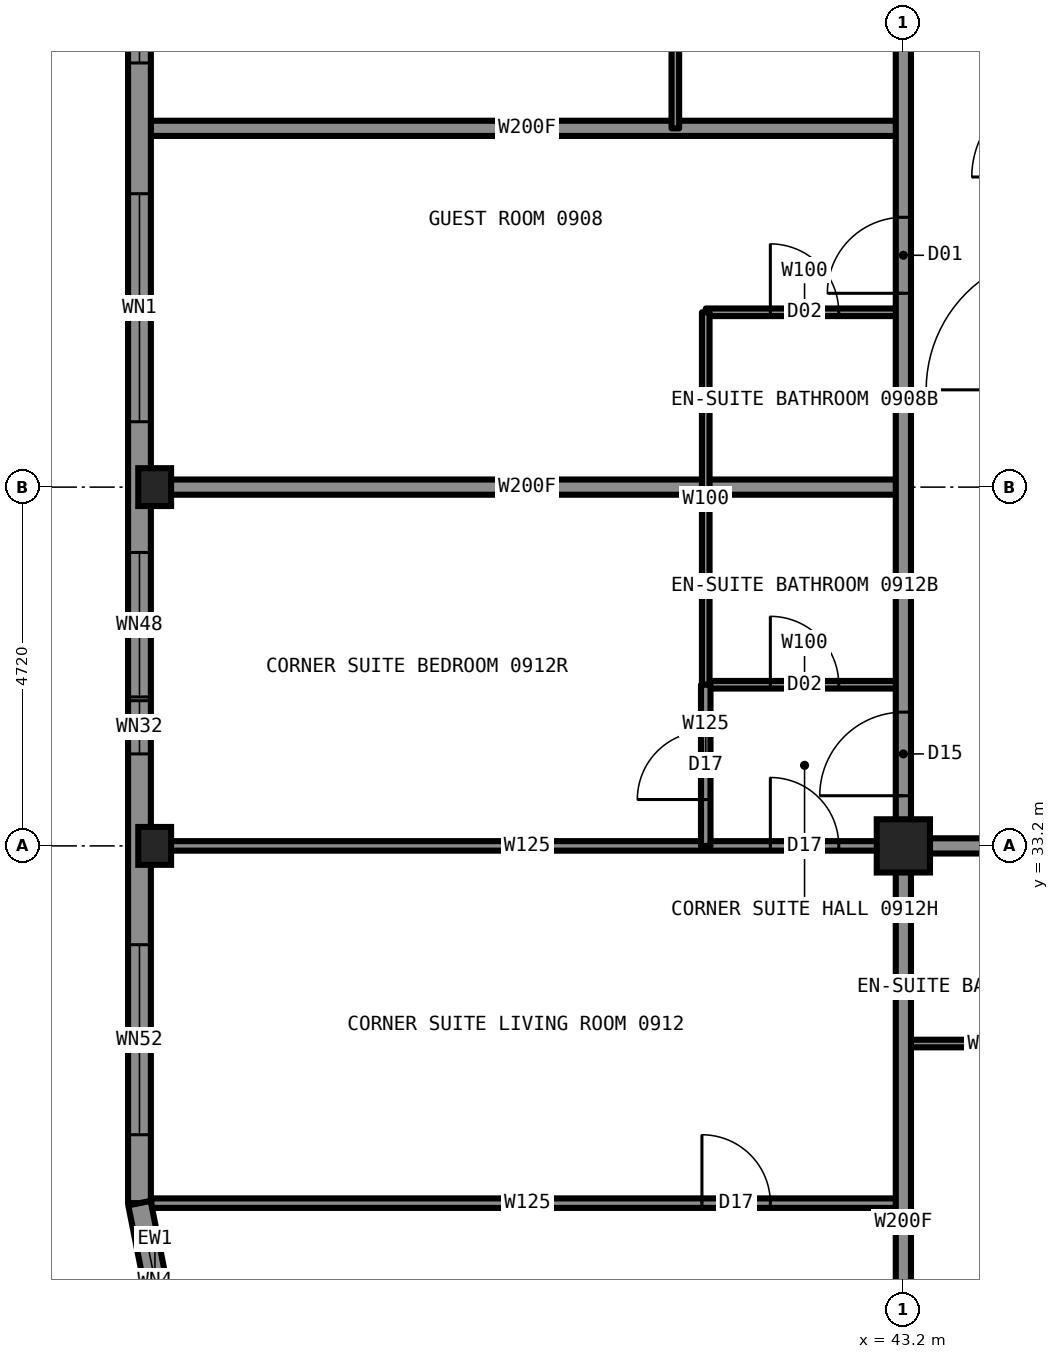
"""IFC4 building model, lengths in metres.
Left out: names, types, materials, properties, quantities, classifications, styles, units other than length and angle.
Written with IfcOpenShell. Run it as: python <this file> out.ifc"""

import sys

from ifc_helpers import new_model, si_unit, direction, frame, frame_2d, origin, origin_2d, place, context, subcontext, project, spatial, rectangle, hollow_rectangle, i_section, extrude, element, fill, save


model = new_model("IFC4")
c1 = context("Model", 3, precision=1e-05, world=origin(), true_north=direction((0.0, 1.0)))
c2 = subcontext(c1, "Body", "Model", "MODEL_VIEW")
j1 = project(units=[si_unit("LENGTHUNIT", "METRE"), si_unit("PLANEANGLEUNIT", "RADIAN")], contexts=[c1])
p1 = place(None, origin())
s1 = spatial("IfcSite", under=j1, at=p1, CompositionType="ELEMENT")
p2 = place(p1, origin())
s2 = spatial("IfcBuilding", under=s1, at=p2, CompositionType="ELEMENT")
p3 = place(p2, frame((0.0, 0.0, 39.0)))
s3 = spatial("IfcBuildingStorey", under=s2, at=p3, CompositionType="ELEMENT", Elevation=39.0)
for number, where, z_axis, x_axis in (
    (1, (33.35, 33.2, 0.0), (0.0, 0.0, 1.0), (1.0, 0.0, 0.0)),
    (2, (33.35, 37.92, 0.0), (0.0, 0.0, 1.0), (1.0, 0.0, 0.0)),
):
    element("IfcColumn", number, at=place(p3, frame(where, z_axis=z_axis, x_axis=x_axis)), inside=s3, PredefinedType="COLUMN", context=c2, shape_type="SweptSolid", body=[
        extrude(i_section(OverallWidth=0.432, OverallDepth=0.498, WebThickness=0.056, FlangeThickness=0.089, at=origin_2d()), origin(), (0.0, 0.0, 1.0), 3.5),
    ])
p4 = place(p3, frame((43.2, 33.2, 0.0), z_axis=(0.0, 0.0, 1.0), x_axis=(1.0, 0.0, 0.0)))
e3 = element("IfcColumn", 3, at=p4, inside=s3, PredefinedType="COLUMN", context=c2, shape_type="SweptSolid", body=[
    extrude(hollow_rectangle(XDim=0.7, YDim=0.7, WallThickness=0.06, at=origin_2d()), origin(), (0.0, 0.0, 1.0), 3.5),
])
p5 = place(p3, frame((43.2, 33.2, 0.0), z_axis=(0.0, 0.0, 1.0), x_axis=(1.0, 0.0, 0.0)))
e4 = element("IfcWall", 4, at=p5, inside=s3, PredefinedType="PARTITIONING", context=c2, shape_type="SweptSolid", body=[
    extrude(rectangle(XDim=23.6, YDim=0.2, at=frame_2d((11.8, 0.0))), origin(), (0.0, 0.0, 1.0), 3.33),
])
p6 = place(p5, frame((2.55, 0.0, 0.0)))
e5 = element("IfcOpeningElement", 5, at=p6, cuts=e4, PredefinedType="OPENING", context=c2, shape_type="SweptSolid", body=[
    extrude(rectangle(XDim=1.0, YDim=2.2, at=frame_2d((0.5, 1.1))), frame((0.0, 0.11, 0.0), z_axis=(0.0, -1.0, 0.0), x_axis=(1.0, 0.0, 0.0)), (0.0, 0.0, 1.0), 0.22),
])
p7 = place(p5, frame((6.57, 0.0, 0.0)))
e6 = element("IfcOpeningElement", 6, at=p7, cuts=e4, PredefinedType="OPENING", context=c2, shape_type="SweptSolid", body=[
    extrude(rectangle(XDim=1.1, YDim=2.2, at=frame_2d((0.55, 1.1))), frame((0.0, 0.11, 0.0), z_axis=(0.0, -1.0, 0.0), x_axis=(1.0, 0.0, 0.0)), (0.0, 0.0, 1.0), 0.22),
])
p8 = place(p5, frame((20.34, 0.0, 0.0)))
e7 = element("IfcOpeningElement", 7, at=p8, cuts=e4, PredefinedType="OPENING", context=c2, shape_type="SweptSolid", body=[
    extrude(rectangle(XDim=1.0, YDim=2.2, at=frame_2d((0.5, 1.1))), frame((0.0, 0.11, 0.0), z_axis=(0.0, -1.0, 0.0), x_axis=(1.0, 0.0, 0.0)), (0.0, 0.0, 1.0), 0.22),
])
p9 = place(p3, frame((33.3, 33.2, 0.0), z_axis=(0.0, 0.0, 1.0), x_axis=(1.0, 0.0, 0.0)))
e8 = element("IfcWall", 8, at=p9, inside=s3, PredefinedType="PARTITIONING", context=c2, shape_type="SweptSolid", body=[
    extrude(rectangle(XDim=9.9, YDim=0.125, at=frame_2d((4.95, 0.0))), origin(), (0.0, 0.0, 1.0), 2.573),
])
p10 = place(p9, frame((8.15, 0.0, 0.0)))
e9 = element("IfcOpeningElement", 9, at=p10, cuts=e8, PredefinedType="OPENING", context=c2, shape_type="SweptSolid", body=[
    extrude(rectangle(XDim=0.9, YDim=2.2, at=frame_2d((0.45, 1.1))), frame((0.0, 0.073, 0.0), z_axis=(0.0, -1.0, 0.0), x_axis=(1.0, 0.0, 0.0)), (0.0, 0.0, 1.0), 0.145),
])
p11 = place(p3, frame((43.2, 30.6, 0.0), z_axis=(0.0, 0.0, 1.0), x_axis=(1.0, 0.0, 0.0)))
e10 = element("IfcWall", 10, at=p11, inside=s3, PredefinedType="PARTITIONING", context=c2, shape_type="SweptSolid", body=[
    extrude(rectangle(XDim=2.3, YDim=0.1, at=frame_2d((1.15, 0.0))), origin(), (0.0, 0.0, 1.0), 3.33),
])
p12 = place(p3, frame((33.306, 28.5, 0.0), z_axis=(0.0, 0.0, 1.0), x_axis=(1.0, 0.0, 0.0)))
e11 = element("IfcWall", 11, at=p12, inside=s3, PredefinedType="PARTITIONING", context=c2, shape_type="SweptSolid", body=[
    extrude(rectangle(XDim=9.894, YDim=0.125, at=frame_2d((4.947, 0.0))), origin(), (0.0, 0.0, 1.0), 3.33),
])
p13 = place(p12, frame((7.244, 0.0, 0.0)))
e12 = element("IfcOpeningElement", 12, at=p13, cuts=e11, PredefinedType="OPENING", context=c2, shape_type="SweptSolid", body=[
    extrude(rectangle(XDim=0.9, YDim=2.2, at=frame_2d((0.45, 1.1))), frame((0.0, 0.073, 0.0), z_axis=(0.0, -1.0, 0.0), x_axis=(1.0, 0.0, 0.0)), (0.0, 0.0, 1.0), 0.145),
])
p14 = place(p3, frame((33.3, 42.64, 0.0), z_axis=(0.0, 0.0, 1.0), x_axis=(1.0, 0.0, 0.0)))
e13 = element("IfcWall", 13, at=p14, inside=s3, PredefinedType="PARTITIONING", context=c2, shape_type="SweptSolid", body=[
    extrude(rectangle(XDim=9.9, YDim=0.2, at=frame_2d((4.95, 0.0))), origin(), (0.0, 0.0, 1.0), 2.723),
])
p15 = place(p3, frame((40.6, 40.22, 0.0), z_axis=(0.0, 0.0, 1.0), x_axis=(1.0, 0.0, 0.0)))
e14 = element("IfcWall", 14, at=p15, inside=s3, PredefinedType="PARTITIONING", context=c2, shape_type="SweptSolid", body=[
    extrude(rectangle(XDim=2.6, YDim=0.1, at=frame_2d((1.3, 0.0))), origin(), (0.0, 0.0, 1.0), 2.723),
])
p16 = place(p15, frame((0.85, 0.0, 0.0)))
e15 = element("IfcOpeningElement", 15, at=p16, cuts=e14, PredefinedType="OPENING", context=c2, shape_type="SweptSolid", body=[
    extrude(rectangle(XDim=0.9, YDim=2.1, at=frame_2d((0.45, 1.05))), frame((0.0, 0.06, 0.0), z_axis=(0.0, -1.0, 0.0), x_axis=(1.0, 0.0, 0.0)), (0.0, 0.0, 1.0), 0.12),
])
p17 = place(p3, frame((33.3, 37.92, 0.0), z_axis=(0.0, 0.0, 1.0), x_axis=(1.0, 0.0, 0.0)))
e16 = element("IfcWall", 16, at=p17, inside=s3, PredefinedType="PARTITIONING", context=c2, shape_type="SweptSolid", body=[
    extrude(rectangle(XDim=9.9, YDim=0.2, at=frame_2d((4.95, 0.0))), origin(), (0.0, 0.0, 1.0), 2.573),
])
p18 = place(p3, frame((40.6, 35.32, 0.0), z_axis=(0.0, 0.0, 1.0), x_axis=(1.0, 0.0, 0.0)))
e17 = element("IfcWall", 17, at=p18, inside=s3, PredefinedType="PARTITIONING", context=c2, shape_type="SweptSolid", body=[
    extrude(rectangle(XDim=2.6, YDim=0.1, at=frame_2d((1.3, 0.0))), origin(), (0.0, 0.0, 1.0), 3.33),
])
p19 = place(p18, frame((0.85, 0.0, 0.0)))
e18 = element("IfcOpeningElement", 18, at=p19, cuts=e17, PredefinedType="OPENING", context=c2, shape_type="SweptSolid", body=[
    extrude(rectangle(XDim=0.9, YDim=2.1, at=frame_2d((0.45, 1.05))), frame((0.0, 0.06, 0.0), z_axis=(0.0, -1.0, 0.0), x_axis=(1.0, 0.0, 0.0)), (0.0, 0.0, 1.0), 0.12),
])
p20 = place(p3, frame((43.2, 33.2, 0.0), z_axis=(0.0, 0.0, 1.0), x_axis=(0.0, 1.0, 0.0)))
e19 = element("IfcWall", 19, at=p20, inside=s3, PredefinedType="PARTITIONING", context=c2, shape_type="SweptSolid", body=[
    extrude(rectangle(XDim=23.58, YDim=0.2, at=frame_2d((11.79, 0.0))), origin(), (0.0, 0.0, 1.0), 3.33),
])
p21 = place(p20, frame((7.27, 0.0, 0.0)))
e20 = element("IfcOpeningElement", 20, at=p21, cuts=e19, PredefinedType="OPENING", context=c2, shape_type="SweptSolid", body=[
    extrude(rectangle(XDim=1.0, YDim=2.2, at=frame_2d((0.5, 1.1))), frame((0.0, 0.11, 0.0), z_axis=(0.0, -1.0, 0.0), x_axis=(1.0, 0.0, 0.0)), (0.0, 0.0, 1.0), 0.22),
])
p22 = place(p20, frame((12.44, 0.0, 0.0)))
e21 = element("IfcOpeningElement", 21, at=p22, cuts=e19, PredefinedType="OPENING", context=c2, shape_type="SweptSolid", body=[
    extrude(rectangle(XDim=1.0, YDim=2.2, at=frame_2d((0.5, 1.1))), frame((0.0, 0.11, 0.0), z_axis=(0.0, -1.0, 0.0), x_axis=(1.0, 0.0, 0.0)), (0.0, 0.0, 1.0), 0.22),
])
p23 = place(p20, frame((21.84, 0.0, 0.0)))
e22 = element("IfcOpeningElement", 22, at=p23, cuts=e19, PredefinedType="OPENING", context=c2, shape_type="SweptSolid", body=[
    extrude(rectangle(XDim=1.1, YDim=2.2, at=frame_2d((0.55, 1.1))), frame((0.0, 0.11, 0.0), z_axis=(0.0, -1.0, 0.0), x_axis=(1.0, 0.0, 0.0)), (0.0, 0.0, 1.0), 0.22),
])
p24 = place(p20, frame((0.66, 0.0, 0.0)))
e23 = element("IfcOpeningElement", 23, at=p24, cuts=e19, PredefinedType="OPENING", context=c2, shape_type="SweptSolid", body=[
    extrude(rectangle(XDim=1.1, YDim=2.2, at=frame_2d((0.55, 1.1))), frame((0.0, 0.11, 0.0), z_axis=(0.0, -1.0, 0.0), x_axis=(1.0, 0.0, 0.0)), (0.0, 0.0, 1.0), 0.22),
])
p25 = place(p3, frame((43.2, 23.3, 0.0), z_axis=(0.0, 0.0, 1.0), x_axis=(0.0, 1.0, 0.0)))
e24 = element("IfcWall", 24, at=p25, inside=s3, PredefinedType="PARTITIONING", context=c2, shape_type="SweptSolid", body=[
    extrude(rectangle(XDim=9.9, YDim=0.2, at=frame_2d((4.95, 0.0))), origin(), (0.0, 0.0, 1.0), 2.573),
])
p26 = place(p3, frame((40.6, 35.32, 0.0), z_axis=(0.0, 0.0, 1.0), x_axis=(0.0, 1.0, 0.0)))
e25 = element("IfcWall", 25, at=p26, inside=s3, PredefinedType="PARTITIONING", context=c2, shape_type="SweptSolid", body=[
    extrude(rectangle(XDim=4.9, YDim=0.1, at=frame_2d((2.45, 0.0))), origin(), (0.0, 0.0, 1.0), 3.33),
])
p27 = place(p3, frame((40.6, 33.2, 0.0), z_axis=(0.0, 0.0, 1.0), x_axis=(0.0, 1.0, 0.0)))
e26 = element("IfcWall", 26, at=p27, inside=s3, PredefinedType="PARTITIONING", context=c2, shape_type="SweptSolid", body=[
    extrude(rectangle(XDim=2.12, YDim=0.125, at=frame_2d((1.06, 0.0))), origin(), (0.0, 0.0, 1.0), 3.33),
])
p28 = place(p27, frame((0.61, 0.0, 0.0)))
e27 = element("IfcOpeningElement", 27, at=p28, cuts=e26, PredefinedType="OPENING", context=c2, shape_type="SweptSolid", body=[
    extrude(rectangle(XDim=0.9, YDim=2.2, at=frame_2d((0.45, 1.1))), frame((0.0, 0.073, 0.0), z_axis=(0.0, -1.0, 0.0), x_axis=(1.0, 0.0, 0.0)), (0.0, 0.0, 1.0), 0.145),
])
p29 = place(p3, frame((40.2, 42.64, 0.0), z_axis=(0.0, 0.0, 1.0), x_axis=(0.0, 1.0, 0.0)))
e28 = element("IfcWall", 28, at=p29, inside=s3, PredefinedType="PARTITIONING", context=c2, shape_type="SweptSolid", body=[
    extrude(rectangle(XDim=2.6, YDim=0.1, at=frame_2d((1.3, 0.0))), origin(), (0.0, 0.0, 1.0), 3.33),
])
p30 = place(p3, frame((33.15, 61.5, 0.0), z_axis=(0.0, 0.0, 1.0), x_axis=(0.0, -1.0, 0.0)))
e29 = element("IfcWall", 29, at=p30, inside=s3, PredefinedType="SOLIDWALL", context=c2, shape_type="SweptSolid", body=[
    extrude(rectangle(XDim=33.0, YDim=0.3, at=frame_2d((16.5, 0.0))), origin(), (0.0, 0.0, 1.0), 2.83),
])
p31 = place(p30, frame((0.85, 0.0, 0.5)))
e30 = element("IfcOpeningElement", 30, at=p31, cuts=e29, PredefinedType="OPENING", context=c2, shape_type="SweptSolid", body=[
    extrude(rectangle(XDim=2.5, YDim=2.0, at=frame_2d((1.25, 1.0))), frame((0.0, 0.16, 0.0), z_axis=(0.0, -1.0, 0.0), x_axis=(1.0, 0.0, 0.0)), (0.0, 0.0, 1.0), 0.32),
])
p32 = place(p30, frame((6.61, 0.0, 0.5)))
e31 = element("IfcOpeningElement", 31, at=p32, cuts=e29, PredefinedType="OPENING", context=c2, shape_type="SweptSolid", body=[
    extrude(rectangle(XDim=1.9, YDim=1.9, at=frame_2d((0.95, 0.95))), frame((0.0, 0.16, 0.0), z_axis=(0.0, -1.0, 0.0), x_axis=(1.0, 0.0, 0.0)), (0.0, 0.0, 1.0), 0.32),
])
p33 = place(p30, frame((10.28, 0.0, 0.5)))
e32 = element("IfcOpeningElement", 32, at=p33, cuts=e29, PredefinedType="OPENING", context=c2, shape_type="SweptSolid", body=[
    extrude(rectangle(XDim=3.0, YDim=2.0, at=frame_2d((1.5, 1.0))), frame((0.0, 0.16, 0.0), z_axis=(0.0, -1.0, 0.0), x_axis=(1.0, 0.0, 0.0)), (0.0, 0.0, 1.0), 0.32),
])
p34 = place(p30, frame((15.0, 0.0, 0.5)))
e33 = element("IfcOpeningElement", 33, at=p34, cuts=e29, PredefinedType="OPENING", context=c2, shape_type="SweptSolid", body=[
    extrude(rectangle(XDim=3.0, YDim=2.0, at=frame_2d((1.5, 1.0))), frame((0.0, 0.16, 0.0), z_axis=(0.0, -1.0, 0.0), x_axis=(1.0, 0.0, 0.0)), (0.0, 0.0, 1.0), 0.32),
])
p35 = place(p30, frame((19.72, 0.0, 0.5)))
e34 = element("IfcOpeningElement", 34, at=p35, cuts=e29, PredefinedType="OPENING", context=c2, shape_type="SweptSolid", body=[
    extrude(rectangle(XDim=3.0, YDim=2.0, at=frame_2d((1.5, 1.0))), frame((0.0, 0.16, 0.0), z_axis=(0.0, -1.0, 0.0), x_axis=(1.0, 0.0, 0.0)), (0.0, 0.0, 1.0), 0.32),
])
p36 = place(p30, frame((24.44, 0.0, 0.5)))
e35 = element("IfcOpeningElement", 35, at=p36, cuts=e29, PredefinedType="OPENING", context=c2, shape_type="SweptSolid", body=[
    extrude(rectangle(XDim=1.9, YDim=1.9, at=frame_2d((0.95, 0.95))), frame((0.0, 0.16, 0.0), z_axis=(0.0, -1.0, 0.0), x_axis=(1.0, 0.0, 0.0)), (0.0, 0.0, 1.0), 0.32),
])
p37 = place(p30, frame((29.6, 0.0, 0.5)))
e36 = element("IfcOpeningElement", 36, at=p37, cuts=e29, PredefinedType="OPENING", context=c2, shape_type="SweptSolid", body=[
    extrude(rectangle(XDim=2.5, YDim=2.0, at=frame_2d((1.25, 1.0))), frame((0.0, 0.16, 0.0), z_axis=(0.0, -1.0, 0.0), x_axis=(1.0, 0.0, 0.0)), (0.0, 0.0, 1.0), 0.32),
])
p38 = place(p30, frame((5.91, 0.0, 0.5)))
e37 = element("IfcOpeningElement", 37, at=p38, cuts=e29, PredefinedType="OPENING", context=c2, shape_type="SweptSolid", body=[
    extrude(rectangle(XDim=0.7, YDim=1.0, at=frame_2d((0.35, 0.5))), frame((0.0, 0.16, 0.0), z_axis=(0.0, -1.0, 0.0), x_axis=(1.0, 0.0, 0.0)), (0.0, 0.0, 1.0), 0.32),
])
p39 = place(p30, frame((26.39, 0.0, 0.5)))
e38 = element("IfcOpeningElement", 38, at=p39, cuts=e29, PredefinedType="OPENING", context=c2, shape_type="SweptSolid", body=[
    extrude(rectangle(XDim=0.7, YDim=1.0, at=frame_2d((0.35, 0.5))), frame((0.0, 0.16, 0.0), z_axis=(0.0, -1.0, 0.0), x_axis=(1.0, 0.0, 0.0)), (0.0, 0.0, 1.0), 0.32),
])
p40 = place(p3, frame((33.15, 28.5, 0.0), z_axis=(0.0, 0.0, 1.0), x_axis=(0.195081421501, -0.980787050784, 0.0)))
e39 = element("IfcWall", 39, at=p40, inside=s3, PredefinedType="SOLIDWALL", context=c2, shape_type="SweptSolid", body=[
    extrude(rectangle(XDim=2.087, YDim=0.3, at=frame_2d((1.044, 0.0))), origin(), (0.0, 0.0, 1.0), 3.33),
])
p41 = place(p40, frame((0.444, 0.0, 0.5)))
e40 = element("IfcOpeningElement", 40, at=p41, cuts=e39, PredefinedType="OPENING", context=c2, shape_type="SweptSolid", body=[
    extrude(rectangle(XDim=1.2, YDim=2.0, at=frame_2d((0.6, 1.0))), frame((0.0, 0.16, 0.0), z_axis=(0.0, -1.0, 0.0), x_axis=(1.0, 0.0, 0.0)), (0.0, 0.0, 1.0), 0.32),
])
p42 = place(p21, origin())
e41 = element("IfcDoor", 41, at=p42, inside=s3, OperationType="SINGLE_SWING_LEFT", PredefinedType="DOOR", context=c2, shape_type="SweptSolid", body=[
    extrude(rectangle(XDim=1.0, YDim=2.2, at=frame_2d((0.5, 1.1))), frame((0.0, 0.025, 0.0), z_axis=(0.0, -1.0, 0.0), x_axis=(1.0, 0.0, 0.0)), (0.0, 0.0, 1.0), 0.05),
])
fill(e20, e41)
p43 = place(p16, origin())
e42 = element("IfcDoor", 42, at=p43, inside=s3, OperationType="SINGLE_SWING_RIGHT", PredefinedType="DOOR", context=c2, shape_type="SweptSolid", body=[
    extrude(rectangle(XDim=0.9, YDim=2.1, at=frame_2d((0.45, 1.05))), frame((0.0, 0.025, 0.0), z_axis=(0.0, -1.0, 0.0), x_axis=(1.0, 0.0, 0.0)), (0.0, 0.0, 1.0), 0.05),
])
fill(e15, e42)
p44 = place(p10, origin())
e43 = element("IfcDoor", 43, at=p44, inside=s3, OperationType="SINGLE_SWING_LEFT", PredefinedType="DOOR", context=c2, shape_type="SweptSolid", body=[
    extrude(rectangle(XDim=0.9, YDim=2.2, at=frame_2d((0.45, 1.1))), frame((0.0, 0.025, 0.0), z_axis=(0.0, -1.0, 0.0), x_axis=(1.0, 0.0, 0.0)), (0.0, 0.0, 1.0), 0.05),
])
fill(e9, e43)
p45 = place(p19, origin())
e44 = element("IfcDoor", 44, at=p45, inside=s3, OperationType="SINGLE_SWING_RIGHT", PredefinedType="DOOR", context=c2, shape_type="SweptSolid", body=[
    extrude(rectangle(XDim=0.9, YDim=2.1, at=frame_2d((0.45, 1.05))), frame((0.0, 0.025, 0.0), z_axis=(0.0, -1.0, 0.0), x_axis=(1.0, 0.0, 0.0)), (0.0, 0.0, 1.0), 0.05),
])
fill(e18, e44)
p46 = place(p24, origin())
e45 = element("IfcDoor", 45, at=p46, inside=s3, OperationType="SINGLE_SWING_LEFT", PredefinedType="DOOR", context=c2, shape_type="SweptSolid", body=[
    extrude(rectangle(XDim=1.1, YDim=2.2, at=frame_2d((0.55, 1.1))), frame((0.0, 0.025, 0.0), z_axis=(0.0, -1.0, 0.0), x_axis=(1.0, 0.0, 0.0)), (0.0, 0.0, 1.0), 0.05),
])
fill(e23, e45)
p47 = place(p13, origin())
e46 = element("IfcDoor", 46, at=p47, inside=s3, OperationType="SINGLE_SWING_LEFT", PredefinedType="DOOR", context=c2, shape_type="SweptSolid", body=[
    extrude(rectangle(XDim=0.9, YDim=2.2, at=frame_2d((0.45, 1.1))), frame((0.0, 0.025, 0.0), z_axis=(0.0, -1.0, 0.0), x_axis=(1.0, 0.0, 0.0)), (0.0, 0.0, 1.0), 0.05),
])
fill(e12, e46)
p48 = place(p28, origin())
e47 = element("IfcDoor", 47, at=p48, inside=s3, OperationType="SINGLE_SWING_LEFT", PredefinedType="DOOR", context=c2, shape_type="SweptSolid", body=[
    extrude(rectangle(XDim=0.9, YDim=2.2, at=frame_2d((0.45, 1.1))), frame((0.0, 0.025, 0.0), z_axis=(0.0, -1.0, 0.0), x_axis=(1.0, 0.0, 0.0)), (0.0, 0.0, 1.0), 0.05),
])
fill(e27, e47)
p49 = place(p34, origin())
e48 = element("IfcWindow", 48, at=p49, inside=s3, PartitioningType="SINGLE_PANEL", PredefinedType="WINDOW", context=c2, shape_type="SweptSolid", body=[
    extrude(rectangle(XDim=3.0, YDim=2.0, at=frame_2d((1.5, 1.0))), frame((0.0, 0.03, 0.0), z_axis=(0.0, -1.0, 0.0), x_axis=(1.0, 0.0, 0.0)), (0.0, 0.0, 1.0), 0.06),
])
fill(e33, e48)
p50 = place(p35, origin())
e49 = element("IfcWindow", 49, at=p50, inside=s3, PartitioningType="SINGLE_PANEL", PredefinedType="WINDOW", context=c2, shape_type="SweptSolid", body=[
    extrude(rectangle(XDim=3.0, YDim=2.0, at=frame_2d((1.5, 1.0))), frame((0.0, 0.03, 0.0), z_axis=(0.0, -1.0, 0.0), x_axis=(1.0, 0.0, 0.0)), (0.0, 0.0, 1.0), 0.06),
])
fill(e34, e49)
p51 = place(p36, origin())
e50 = element("IfcWindow", 50, at=p51, inside=s3, PartitioningType="SINGLE_PANEL", PredefinedType="WINDOW", context=c2, shape_type="SweptSolid", body=[
    extrude(rectangle(XDim=1.9, YDim=1.9, at=frame_2d((0.95, 0.95))), frame((0.0, 0.03, 0.0), z_axis=(0.0, -1.0, 0.0), x_axis=(1.0, 0.0, 0.0)), (0.0, 0.0, 1.0), 0.06),
])
fill(e35, e50)
p52 = place(p37, origin())
e51 = element("IfcWindow", 51, at=p52, inside=s3, PartitioningType="SINGLE_PANEL", PredefinedType="WINDOW", context=c2, shape_type="SweptSolid", body=[
    extrude(rectangle(XDim=2.5, YDim=2.0, at=frame_2d((1.25, 1.0))), frame((0.0, 0.03, 0.0), z_axis=(0.0, -1.0, 0.0), x_axis=(1.0, 0.0, 0.0)), (0.0, 0.0, 1.0), 0.06),
])
fill(e36, e51)
p53 = place(p41, origin())
e52 = element("IfcWindow", 52, at=p53, inside=s3, PartitioningType="SINGLE_PANEL", PredefinedType="WINDOW", context=c2, shape_type="SweptSolid", body=[
    extrude(rectangle(XDim=1.2, YDim=2.0, at=frame_2d((0.6, 1.0))), frame((0.0, 0.03, 0.0), z_axis=(0.0, -1.0, 0.0), x_axis=(1.0, 0.0, 0.0)), (0.0, 0.0, 1.0), 0.06),
])
fill(e40, e52)
p54 = place(p39, origin())
e53 = element("IfcWindow", 53, at=p54, inside=s3, PartitioningType="SINGLE_PANEL", PredefinedType="WINDOW", context=c2, shape_type="SweptSolid", body=[
    extrude(rectangle(XDim=0.7, YDim=1.0, at=frame_2d((0.35, 0.5))), frame((0.0, 0.03, 0.0), z_axis=(0.0, -1.0, 0.0), x_axis=(1.0, 0.0, 0.0)), (0.0, 0.0, 1.0), 0.06),
])
fill(e38, e53)
save(model, sys.argv[1])
